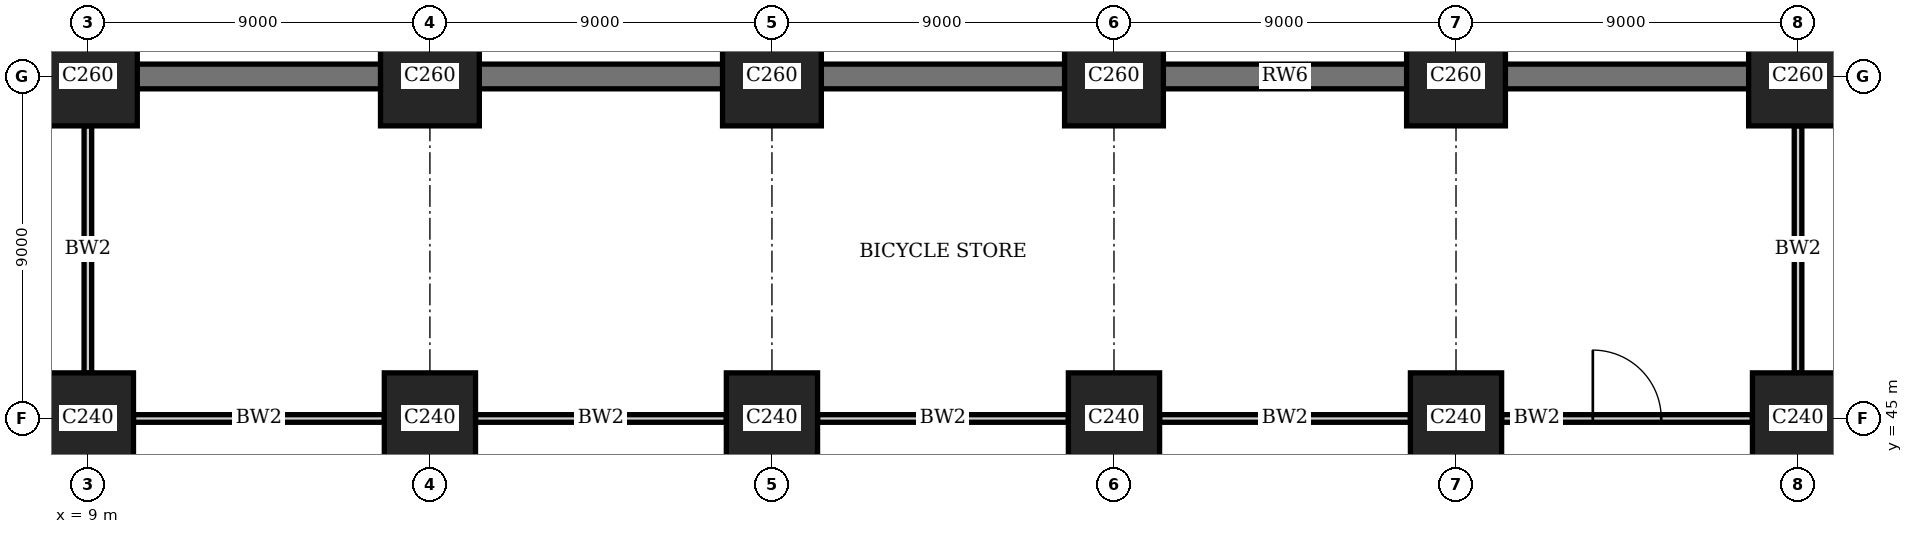
"""IFC4 building model, lengths in metres.
Left out: names, types, materials, properties, quantities, classifications, styles, units other than length and angle.
Written with IfcOpenShell. Run it as: python <this file> out.ifc"""

import sys

from ifc_helpers import new_model, si_unit, direction, frame, frame_2d, origin, origin_2d, place, context, subcontext, project, spatial, rectangle, extrude, element, fill, save


model = new_model("IFC4")
c1 = context("Model", 3, precision=1e-05, world=origin(), true_north=direction((0.0, 1.0)))
c2 = subcontext(c1, "Body", "Model", "MODEL_VIEW")
j1 = project(units=[si_unit("LENGTHUNIT", "METRE"), si_unit("PLANEANGLEUNIT", "RADIAN")], contexts=[c1])
p1 = place(None, origin())
s1 = spatial("IfcSite", under=j1, at=p1, CompositionType="ELEMENT")
p2 = place(p1, origin())
s2 = spatial("IfcBuilding", under=s1, at=p2, CompositionType="ELEMENT")
p3 = place(p2, frame((0.0, 0.0, -5.0)))
s3 = spatial("IfcBuildingStorey", under=s2, at=p3, CompositionType="ELEMENT", Elevation=-5.0)
p4 = place(p3, frame((9.0, 45.0, -0.45), z_axis=(0.0, 0.0, 1.0), x_axis=(1.0, 0.0, 0.0)))
e1 = element("IfcColumn", 1, at=p4, inside=s3, PredefinedType="COLUMN", context=c2, shape_type="SweptSolid", body=[
    extrude(rectangle(XDim=2.4, YDim=2.4, at=origin_2d()), origin(), (0.0, 0.0, 1.0), 5.45),
])
p5 = place(p3, frame((9.0, 54.0, -0.45), z_axis=(0.0, 0.0, 1.0), x_axis=(1.0, 0.0, 0.0)))
e2 = element("IfcColumn", 2, at=p5, inside=s3, PredefinedType="COLUMN", context=c2, shape_type="SweptSolid", body=[
    extrude(rectangle(XDim=2.6, YDim=2.6, at=origin_2d()), origin(), (0.0, 0.0, 1.0), 5.45),
])
p6 = place(p3, frame((18.0, 45.0, -0.45), z_axis=(0.0, 0.0, 1.0), x_axis=(1.0, 0.0, 0.0)))
e3 = element("IfcColumn", 3, at=p6, inside=s3, PredefinedType="COLUMN", context=c2, shape_type="SweptSolid", body=[
    extrude(rectangle(XDim=2.4, YDim=2.4, at=origin_2d()), origin(), (0.0, 0.0, 1.0), 5.45),
])
p7 = place(p3, frame((18.0, 54.0, -0.45), z_axis=(0.0, 0.0, 1.0), x_axis=(1.0, 0.0, 0.0)))
e4 = element("IfcColumn", 4, at=p7, inside=s3, PredefinedType="COLUMN", context=c2, shape_type="SweptSolid", body=[
    extrude(rectangle(XDim=2.6, YDim=2.6, at=origin_2d()), origin(), (0.0, 0.0, 1.0), 5.45),
])
p8 = place(p3, frame((27.0, 45.0, -0.45), z_axis=(0.0, 0.0, 1.0), x_axis=(1.0, 0.0, 0.0)))
e5 = element("IfcColumn", 5, at=p8, inside=s3, PredefinedType="COLUMN", context=c2, shape_type="SweptSolid", body=[
    extrude(rectangle(XDim=2.4, YDim=2.4, at=origin_2d()), origin(), (0.0, 0.0, 1.0), 5.45),
])
p9 = place(p3, frame((27.0, 54.0, -0.45), z_axis=(0.0, 0.0, 1.0), x_axis=(1.0, 0.0, 0.0)))
e6 = element("IfcColumn", 6, at=p9, inside=s3, PredefinedType="COLUMN", context=c2, shape_type="SweptSolid", body=[
    extrude(rectangle(XDim=2.6, YDim=2.6, at=origin_2d()), origin(), (0.0, 0.0, 1.0), 5.45),
])
p10 = place(p3, frame((36.0, 45.0, -0.45), z_axis=(0.0, 0.0, 1.0), x_axis=(1.0, 0.0, 0.0)))
e7 = element("IfcColumn", 7, at=p10, inside=s3, PredefinedType="COLUMN", context=c2, shape_type="SweptSolid", body=[
    extrude(rectangle(XDim=2.4, YDim=2.4, at=origin_2d()), origin(), (0.0, 0.0, 1.0), 5.45),
])
p11 = place(p3, frame((36.0, 54.0, -0.45), z_axis=(0.0, 0.0, 1.0), x_axis=(1.0, 0.0, 0.0)))
e8 = element("IfcColumn", 8, at=p11, inside=s3, PredefinedType="COLUMN", context=c2, shape_type="SweptSolid", body=[
    extrude(rectangle(XDim=2.6, YDim=2.6, at=origin_2d()), origin(), (0.0, 0.0, 1.0), 5.45),
])
p12 = place(p3, frame((45.0, 45.0, -0.45), z_axis=(0.0, 0.0, 1.0), x_axis=(1.0, 0.0, 0.0)))
e9 = element("IfcColumn", 9, at=p12, inside=s3, PredefinedType="COLUMN", context=c2, shape_type="SweptSolid", body=[
    extrude(rectangle(XDim=2.4, YDim=2.4, at=origin_2d()), origin(), (0.0, 0.0, 1.0), 5.45),
])
p13 = place(p3, frame((45.0, 54.0, -0.45), z_axis=(0.0, 0.0, 1.0), x_axis=(1.0, 0.0, 0.0)))
e10 = element("IfcColumn", 10, at=p13, inside=s3, PredefinedType="COLUMN", context=c2, shape_type="SweptSolid", body=[
    extrude(rectangle(XDim=2.6, YDim=2.6, at=origin_2d()), origin(), (0.0, 0.0, 1.0), 5.45),
])
p14 = place(p3, frame((54.0, 45.0, -0.45), z_axis=(0.0, 0.0, 1.0), x_axis=(1.0, 0.0, 0.0)))
e11 = element("IfcColumn", 11, at=p14, inside=s3, PredefinedType="COLUMN", context=c2, shape_type="SweptSolid", body=[
    extrude(rectangle(XDim=2.4, YDim=2.4, at=origin_2d()), origin(), (0.0, 0.0, 1.0), 5.45),
])
p15 = place(p3, frame((54.0, 54.0, -0.45), z_axis=(0.0, 0.0, 1.0), x_axis=(1.0, 0.0, 0.0)))
e12 = element("IfcColumn", 12, at=p15, inside=s3, PredefinedType="COLUMN", context=c2, shape_type="SweptSolid", body=[
    extrude(rectangle(XDim=2.6, YDim=2.6, at=origin_2d()), origin(), (0.0, 0.0, 1.0), 5.45),
])
p16 = place(p3, frame((63.0, 54.0, -0.45), z_axis=(0.0, 0.0, 1.0), x_axis=(-1.0, 0.0, 0.0)))
e13 = element("IfcWall", 13, at=p16, inside=s3, PredefinedType="SOLIDWALL", context=c2, shape_type="SweptSolid", body=[
    extrude(rectangle(XDim=63.0, YDim=0.65, at=frame_2d((31.5, 0.0))), origin(), (0.0, 0.0, 1.0), 5.45),
])
for number, where, z_axis, x_axis in (
    (14, (9.0, 46.2, 0.0), (0.0, 0.0, 1.0), (0.0, 1.0, 0.0)),
    (15, (54.0, 46.2, 0.0), (0.0, 0.0, 1.0), (0.0, 1.0, 0.0)),
):
    element("IfcWall", number, at=place(p3, frame(where, z_axis=z_axis, x_axis=x_axis)), inside=s3, PredefinedType="SOLIDWALL", context=c2, shape_type="SweptSolid", body=[
        extrude(rectangle(XDim=6.5, YDim=0.2, at=frame_2d((3.25, 0.0))), origin(), (0.0, 0.0, 1.0), 3.9),
    ])
for number, where, z_axis, x_axis in (
    (16, (10.2, 45.0, 0.0), (0.0, 0.0, 1.0), (1.0, 0.0, 0.0)),
    (17, (19.2, 45.0, 0.0), (0.0, 0.0, 1.0), (1.0, 0.0, 0.0)),
    (18, (28.2, 45.0, 0.0), (0.0, 0.0, 1.0), (1.0, 0.0, 0.0)),
    (19, (37.2, 45.0, 0.0), (0.0, 0.0, 1.0), (1.0, 0.0, 0.0)),
):
    element("IfcWall", number, at=place(p3, frame(where, z_axis=z_axis, x_axis=x_axis)), inside=s3, PredefinedType="SOLIDWALL", context=c2, shape_type="SweptSolid", body=[
        extrude(rectangle(XDim=6.6, YDim=0.2, at=frame_2d((3.3, 0.0))), origin(), (0.0, 0.0, 1.0), 3.9),
    ])
p17 = place(p3, frame((46.2, 45.0, 0.0), z_axis=(0.0, 0.0, 1.0), x_axis=(1.0, 0.0, 0.0)))
e20 = element("IfcWall", 20, at=p17, inside=s3, PredefinedType="SOLIDWALL", context=c2, shape_type="SweptSolid", body=[
    extrude(rectangle(XDim=6.6, YDim=0.2, at=frame_2d((3.3, 0.0))), origin(), (0.0, 0.0, 1.0), 3.9),
])
p18 = place(p17, frame((2.4, 0.0, 0.0)))
e21 = element("IfcOpeningElement", 21, at=p18, cuts=e20, PredefinedType="OPENING", context=c2, shape_type="SweptSolid", body=[
    extrude(rectangle(XDim=1.8, YDim=2.4, at=frame_2d((0.9, 1.2))), frame((0.0, 0.11, 0.0), z_axis=(0.0, -1.0, 0.0), x_axis=(1.0, 0.0, 0.0)), (0.0, 0.0, 1.0), 0.22),
])
p19 = place(p18, origin())
e22 = element("IfcDoor", 22, at=p19, inside=s3, OperationType="DOUBLE_DOOR_SINGLE_SWING", PredefinedType="DOOR", context=c2, shape_type="SweptSolid", body=[
    extrude(rectangle(XDim=1.8, YDim=2.4, at=frame_2d((0.9, 1.2))), frame((0.0, 0.025, 0.0), z_axis=(0.0, -1.0, 0.0), x_axis=(1.0, 0.0, 0.0)), (0.0, 0.0, 1.0), 0.05),
])
fill(e21, e22)
save(model, sys.argv[1])
